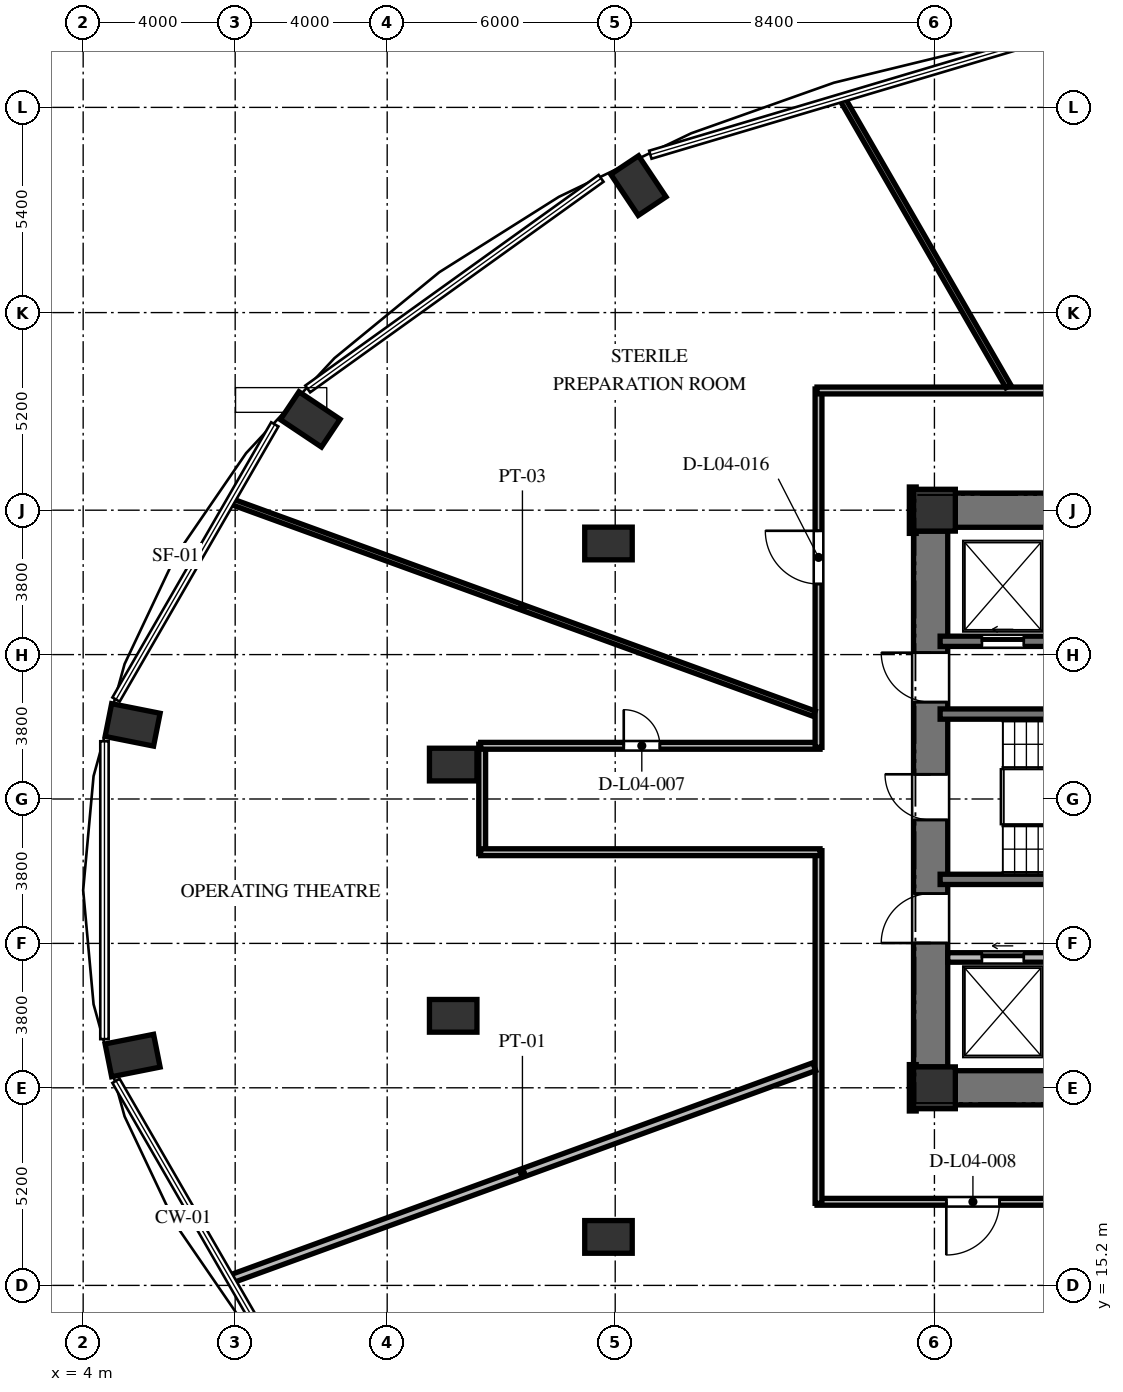
"""IFC4 building model, lengths in metres.
Left out: names, types, materials, properties, quantities, classifications, styles, units other than length and angle.
Written with IfcOpenShell. Run it as: python <this file> out.ifc"""

import sys

from ifc_helpers import new_model, si_unit, direction, frame, frame_2d, origin, origin_2d, place, context, subcontext, project, spatial, rectangle, extrude, element, fill, save


model = new_model("IFC4")
c1 = context("Model", 3, precision=1e-05, world=origin(), true_north=direction((0.0, 1.0)))
c2 = subcontext(c1, "Body", "Model", "MODEL_VIEW")
j1 = project(units=[si_unit("LENGTHUNIT", "METRE"), si_unit("PLANEANGLEUNIT", "RADIAN")], contexts=[c1])
p1 = place(None, origin())
s1 = spatial("IfcSite", under=j1, at=p1, CompositionType="ELEMENT")
p2 = place(p1, origin())
s2 = spatial("IfcBuilding", under=s1, at=p2, CompositionType="ELEMENT")
p3 = place(p2, frame((0.0, 0.0, 20.4)))
s3 = spatial("IfcBuildingStorey", under=s2, at=p3, CompositionType="ELEMENT", Elevation=20.4)
for number, where, z_axis, x_axis in (
    (1, (18.611, 44.142, 0.0), (0.0, 0.0, 1.0), (-0.556, 0.831, 0.0)),
    (2, (9.975, 37.989, 0.0), (0.0, 0.0, 1.0), (-0.831, 0.556, 0.0)),
    (3, (5.302, 29.95, 0.0), (0.0, 0.0, 1.0), (-0.981, 0.195, 0.0)),
    (4, (5.302, 21.25, 0.0), (0.0, 0.0, 1.0), (-0.981, -0.195, 0.0)),
):
    element("IfcColumn", number, at=place(p3, frame(where, z_axis=z_axis, x_axis=x_axis)), inside=s3, PredefinedType="COLUMN", context=c2, shape_type="SweptSolid", body=[
        extrude(rectangle(XDim=1.3, YDim=0.88, at=origin_2d()), origin(), (0.0, 0.0, 1.0), 4.8),
    ])
for number, where, z_axis, x_axis in (
    (5, (26.4, 20.4, 0.0), (0.0, 0.0, 1.0), (1.0, 0.0, 0.0)),
    (6, (26.4, 35.6, 0.0), (0.0, 0.0, 1.0), (1.0, 0.0, 0.0)),
):
    element("IfcColumn", number, at=place(p3, frame(where, z_axis=z_axis, x_axis=x_axis)), inside=s3, PredefinedType="COLUMN", context=c2, shape_type="SweptSolid", body=[
        extrude(rectangle(XDim=1.1, YDim=1.1, at=origin_2d()), origin(), (0.0, 0.0, 1.0), 4.8),
    ])
for number, where, z_axis, x_axis in (
    (7, (17.823, 34.724, 0.0), (0.0, 0.0, 1.0), (1.0, 0.0, 0.0)),
    (8, (13.737, 28.906, 0.0), (0.0, 0.0, 1.0), (1.0, 0.0, 0.0)),
    (9, (13.737, 22.294, 0.0), (0.0, 0.0, 1.0), (1.0, 0.0, 0.0)),
    (10, (17.823, 16.476, 0.0), (0.0, 0.0, 1.0), (1.0, 0.0, 0.0)),
):
    element("IfcColumn", number, at=place(p3, frame(where, z_axis=z_axis, x_axis=x_axis)), inside=s3, PredefinedType="COLUMN", context=c2, shape_type="SweptSolid", body=[
        extrude(rectangle(XDim=1.25, YDim=0.86, at=origin_2d()), origin(), (0.0, 0.0, 1.0), 4.8),
    ])
p4 = place(p3, frame((26.3, 20.95, 0.0), z_axis=(0.0, 0.0, 1.0), x_axis=(0.0, 1.0, 0.0)))
e11 = element("IfcWall", 11, at=p4, inside=s3, PredefinedType="SHEAR", context=c2, shape_type="SweptSolid", body=[
    extrude(rectangle(XDim=14.1, YDim=0.9, at=frame_2d((7.05, 0.0))), origin(), (0.0, 0.0, 1.0), 4.8),
])
p5 = place(p4, frame((6.5, 0.0, 0.0)))
e12 = element("IfcOpeningElement", 12, at=p5, cuts=e11, PredefinedType="OPENING", context=c2, shape_type="SweptSolid", body=[
    extrude(rectangle(XDim=1.2, YDim=2.15, at=frame_2d((0.6, 1.075))), frame((0.0, 0.46, 0.0), z_axis=(0.0, -1.0, 0.0), x_axis=(1.0, 0.0, 0.0)), (0.0, 0.0, 1.0), 0.92),
])
p6 = place(p4, frame((9.6, 0.0, 0.0)))
e13 = element("IfcOpeningElement", 13, at=p6, cuts=e11, PredefinedType="OPENING", context=c2, shape_type="SweptSolid", body=[
    extrude(rectangle(XDim=1.3, YDim=2.2, at=frame_2d((0.65, 1.1))), frame((0.0, 0.46, 0.0), z_axis=(0.0, -1.0, 0.0), x_axis=(1.0, 0.0, 0.0)), (0.0, 0.0, 1.0), 0.92),
])
p7 = place(p4, frame((3.26, 0.0, 0.0)))
e14 = element("IfcOpeningElement", 14, at=p7, cuts=e11, PredefinedType="OPENING", context=c2, shape_type="SweptSolid", body=[
    extrude(rectangle(XDim=1.3, YDim=2.2, at=frame_2d((0.65, 1.1))), frame((0.0, 0.46, 0.0), z_axis=(0.0, -1.0, 0.0), x_axis=(1.0, 0.0, 0.0)), (0.0, 0.0, 1.0), 0.92),
])
for number, where, z_axis, x_axis in (
    (15, (26.95, 20.4, 0.0), (0.0, 0.0, 1.0), (1.0, 0.0, 0.0)),
    (16, (26.95, 35.6, 0.0), (0.0, 0.0, 1.0), (1.0, 0.0, 0.0)),
):
    element("IfcWall", number, at=place(p3, frame(where, z_axis=z_axis, x_axis=x_axis)), inside=s3, PredefinedType="SHEAR", context=c2, shape_type="SweptSolid", body=[
        extrude(rectangle(XDim=5.3, YDim=0.9, at=frame_2d((2.65, 0.0))), origin(), (0.0, 0.0, 1.0), 4.8),
    ])
for number, where, z_axis, x_axis in (
    (17, (26.55, 30.235, 0.0), (0.0, 0.0, 1.0), (1.0, 0.0, 0.0)),
    (18, (26.55, 25.885, 0.0), (0.0, 0.0, 1.0), (1.0, 0.0, 0.0)),
):
    element("IfcWall", number, at=place(p3, frame(where, z_axis=z_axis, x_axis=x_axis)), inside=s3, PredefinedType="SHEAR", context=c2, shape_type="SweptSolid", body=[
        extrude(rectangle(XDim=7.985, YDim=0.27, at=frame_2d((3.992, 0.0))), origin(), (0.0, 0.0, 1.0), 4.8),
    ])
p8 = place(p3, frame((26.55, 32.15, 0.0), z_axis=(0.0, 0.0, 1.0), x_axis=(1.0, 0.0, 0.0)))
e19 = element("IfcWall", 19, at=p8, inside=s3, PredefinedType="SHEAR", context=c2, shape_type="SweptSolid", body=[
    extrude(rectangle(XDim=16.4, YDim=0.27, at=frame_2d((8.2, 0.0))), origin(), (0.0, 0.0, 1.0), 4.8),
])
p9 = place(p8, frame((1.1, 0.0, 0.0)))
e20 = element("IfcOpeningElement", 20, at=p9, cuts=e19, PredefinedType="OPENING", context=c2, shape_type="SweptSolid", body=[
    extrude(rectangle(XDim=1.1, YDim=2.2, at=frame_2d((0.55, 1.1))), frame((0.0, 0.145, 0.0), z_axis=(0.0, -1.0, 0.0), x_axis=(1.0, 0.0, 0.0)), (0.0, 0.0, 1.0), 0.29),
])
p10 = place(p8, frame((3.7, 0.0, 0.0)))
e21 = element("IfcOpeningElement", 21, at=p10, cuts=e19, PredefinedType="OPENING", context=c2, shape_type="SweptSolid", body=[
    extrude(rectangle(XDim=1.1, YDim=2.2, at=frame_2d((0.55, 1.1))), frame((0.0, 0.145, 0.0), z_axis=(0.0, -1.0, 0.0), x_axis=(1.0, 0.0, 0.0)), (0.0, 0.0, 1.0), 0.29),
])
p11 = place(p8, frame((6.5, 0.0, 0.0)))
e22 = element("IfcOpeningElement", 22, at=p11, cuts=e19, PredefinedType="OPENING", context=c2, shape_type="SweptSolid", body=[
    extrude(rectangle(XDim=1.1, YDim=2.2, at=frame_2d((0.55, 1.1))), frame((0.0, 0.145, 0.0), z_axis=(0.0, -1.0, 0.0), x_axis=(1.0, 0.0, 0.0)), (0.0, 0.0, 1.0), 0.29),
])
p12 = place(p8, frame((9.1, 0.0, 0.0)))
e23 = element("IfcOpeningElement", 23, at=p12, cuts=e19, PredefinedType="OPENING", context=c2, shape_type="SweptSolid", body=[
    extrude(rectangle(XDim=1.1, YDim=2.2, at=frame_2d((0.55, 1.1))), frame((0.0, 0.145, 0.0), z_axis=(0.0, -1.0, 0.0), x_axis=(1.0, 0.0, 0.0)), (0.0, 0.0, 1.0), 0.29),
])
p13 = place(p8, frame((11.9, 0.0, 0.0)))
e24 = element("IfcOpeningElement", 24, at=p13, cuts=e19, PredefinedType="OPENING", context=c2, shape_type="SweptSolid", body=[
    extrude(rectangle(XDim=1.1, YDim=2.2, at=frame_2d((0.55, 1.1))), frame((0.0, 0.145, 0.0), z_axis=(0.0, -1.0, 0.0), x_axis=(1.0, 0.0, 0.0)), (0.0, 0.0, 1.0), 0.29),
])
p14 = place(p8, frame((14.5, 0.0, 0.0)))
e25 = element("IfcOpeningElement", 25, at=p14, cuts=e19, PredefinedType="OPENING", context=c2, shape_type="SweptSolid", body=[
    extrude(rectangle(XDim=1.1, YDim=2.2, at=frame_2d((0.55, 1.1))), frame((0.0, 0.145, 0.0), z_axis=(0.0, -1.0, 0.0), x_axis=(1.0, 0.0, 0.0)), (0.0, 0.0, 1.0), 0.29),
])
p15 = place(p3, frame((26.75, 23.83, 0.0), z_axis=(0.0, 0.0, 1.0), x_axis=(1.0, 0.0, 0.0)))
e26 = element("IfcWall", 26, at=p15, inside=s3, PredefinedType="SOLIDWALL", context=c2, shape_type="SweptSolid", body=[
    extrude(rectangle(XDim=16.2, YDim=0.25, at=frame_2d((8.1, 0.0))), origin(), (0.0, 0.0, 1.0), 4.58),
])
p16 = place(p15, frame((0.9, 0.0, 0.0)))
e27 = element("IfcOpeningElement", 27, at=p16, cuts=e26, PredefinedType="OPENING", context=c2, shape_type="SweptSolid", body=[
    extrude(rectangle(XDim=1.1, YDim=2.2, at=frame_2d((0.55, 1.1))), frame((0.0, 0.135, 0.0), z_axis=(0.0, -1.0, 0.0), x_axis=(1.0, 0.0, 0.0)), (0.0, 0.0, 1.0), 0.27),
])
p17 = place(p15, frame((3.5, 0.0, 0.0)))
e28 = element("IfcOpeningElement", 28, at=p17, cuts=e26, PredefinedType="OPENING", context=c2, shape_type="SweptSolid", body=[
    extrude(rectangle(XDim=1.1, YDim=2.2, at=frame_2d((0.55, 1.1))), frame((0.0, 0.135, 0.0), z_axis=(0.0, -1.0, 0.0), x_axis=(1.0, 0.0, 0.0)), (0.0, 0.0, 1.0), 0.27),
])
p18 = place(p15, frame((6.3, 0.0, 0.0)))
e29 = element("IfcOpeningElement", 29, at=p18, cuts=e26, PredefinedType="OPENING", context=c2, shape_type="SweptSolid", body=[
    extrude(rectangle(XDim=1.1, YDim=2.2, at=frame_2d((0.55, 1.1))), frame((0.0, 0.135, 0.0), z_axis=(0.0, -1.0, 0.0), x_axis=(1.0, 0.0, 0.0)), (0.0, 0.0, 1.0), 0.27),
])
p19 = place(p15, frame((8.9, 0.0, 0.0)))
e30 = element("IfcOpeningElement", 30, at=p19, cuts=e26, PredefinedType="OPENING", context=c2, shape_type="SweptSolid", body=[
    extrude(rectangle(XDim=1.1, YDim=2.2, at=frame_2d((0.55, 1.1))), frame((0.0, 0.135, 0.0), z_axis=(0.0, -1.0, 0.0), x_axis=(1.0, 0.0, 0.0)), (0.0, 0.0, 1.0), 0.27),
])
p20 = place(p15, frame((11.7, 0.0, 0.0)))
e31 = element("IfcOpeningElement", 31, at=p20, cuts=e26, PredefinedType="OPENING", context=c2, shape_type="SweptSolid", body=[
    extrude(rectangle(XDim=1.1, YDim=2.2, at=frame_2d((0.55, 1.1))), frame((0.0, 0.135, 0.0), z_axis=(0.0, -1.0, 0.0), x_axis=(1.0, 0.0, 0.0)), (0.0, 0.0, 1.0), 0.27),
])
p21 = place(p15, frame((14.15, 0.0, 0.0)))
e32 = element("IfcOpeningElement", 32, at=p21, cuts=e26, PredefinedType="OPENING", context=c2, shape_type="SweptSolid", body=[
    extrude(rectangle(XDim=1.4, YDim=2.3, at=frame_2d((0.7, 1.15))), frame((0.0, 0.135, 0.0), z_axis=(0.0, -1.0, 0.0), x_axis=(1.0, 0.0, 0.0)), (0.0, 0.0, 1.0), 0.27),
])
p22 = place(p3, frame((14.5, 26.56, 0.0), z_axis=(0.0, 0.0, 1.0), x_axis=(0.0, 1.0, 0.0)))
e33 = element("IfcWall", 33, at=p22, inside=s3, PredefinedType="PARTITIONING", context=c2, shape_type="SweptSolid", body=[
    extrude(rectangle(XDim=2.88, YDim=0.18, at=frame_2d((1.44, 0.0))), origin(), (0.0, 0.0, 1.0), 4.58),
])
p23 = place(p3, frame((14.46, 29.4, 0.0), z_axis=(0.0, 0.0, 1.0), x_axis=(1.0, 0.0, 0.0)))
e34 = element("IfcWall", 34, at=p23, inside=s3, PredefinedType="PARTITIONING", context=c2, shape_type="SweptSolid", body=[
    extrude(rectangle(XDim=8.93, YDim=0.18, at=frame_2d((4.465, 0.0))), origin(), (0.0, 0.0, 1.0), 4.58),
])
p24 = place(p23, frame((3.765, 0.0, 0.0)))
e35 = element("IfcOpeningElement", 35, at=p24, cuts=e34, PredefinedType="OPENING", context=c2, shape_type="SweptSolid", body=[
    extrude(rectangle(XDim=0.95, YDim=2.1, at=frame_2d((0.475, 1.05))), frame((0.0, 0.1, 0.0), z_axis=(0.0, -1.0, 0.0), x_axis=(1.0, 0.0, 0.0)), (0.0, 0.0, 1.0), 0.2),
])
p25 = place(p3, frame((23.35, 29.36, 0.0), z_axis=(0.0, 0.0, 1.0), x_axis=(0.0, 1.0, 0.0)))
e36 = element("IfcWall", 36, at=p25, inside=s3, PredefinedType="PARTITIONING", context=c2, shape_type="SweptSolid", body=[
    extrude(rectangle(XDim=9.43, YDim=0.18, at=frame_2d((4.715, 0.0))), origin(), (0.0, 0.0, 1.0), 4.58),
])
p26 = place(p25, frame((4.298, 0.0, 0.0)))
e37 = element("IfcOpeningElement", 37, at=p26, cuts=e36, PredefinedType="OPENING", context=c2, shape_type="SweptSolid", body=[
    extrude(rectangle(XDim=1.4, YDim=2.2, at=frame_2d((0.7, 1.1))), frame((0.0, 0.1, 0.0), z_axis=(0.0, -1.0, 0.0), x_axis=(1.0, 0.0, 0.0)), (0.0, 0.0, 1.0), 0.2),
])
p27 = place(p3, frame((23.31, 38.75, 0.0), z_axis=(0.0, 0.0, 1.0), x_axis=(1.0, 0.0, 0.0)))
e38 = element("IfcWall", 38, at=p27, inside=s3, PredefinedType="PARTITIONING", context=c2, shape_type="SweptSolid", body=[
    extrude(rectangle(XDim=29.88, YDim=0.18, at=frame_2d((14.94, 0.0))), origin(), (0.0, 0.0, 1.0), 4.58),
])
p28 = place(p27, frame((22.324, 0.0, 0.0)))
e39 = element("IfcOpeningElement", 39, at=p28, cuts=e38, PredefinedType="OPENING", context=c2, shape_type="SweptSolid", body=[
    extrude(rectangle(XDim=1.05, YDim=2.15, at=frame_2d((0.525, 1.075))), frame((0.0, 0.1, 0.0), z_axis=(0.0, -1.0, 0.0), x_axis=(1.0, 0.0, 0.0)), (0.0, 0.0, 1.0), 0.2),
])
p29 = place(p27, frame((11.015, 0.0, 0.0)))
e40 = element("IfcOpeningElement", 40, at=p29, cuts=e38, PredefinedType="OPENING", context=c2, shape_type="SweptSolid", body=[
    extrude(rectangle(XDim=0.95, YDim=2.1, at=frame_2d((0.475, 1.05))), frame((0.0, 0.1, 0.0), z_axis=(0.0, -1.0, 0.0), x_axis=(1.0, 0.0, 0.0)), (0.0, 0.0, 1.0), 0.2),
])
for number, where, z_axis, x_axis in (
    (41, (25.83, 36.21, 0.0), (0.0, 0.0, 1.0), (0.0, -1.0, 0.0)),
    (42, (25.83, 21.01, 0.0), (0.0, 0.0, 1.0), (0.0, -1.0, 0.0)),
):
    element("IfcWall", number, at=place(p3, frame(where, z_axis=z_axis, x_axis=x_axis)), inside=s3, PredefinedType="PARTITIONING", context=c2, shape_type="SweptSolid", body=[
        extrude(rectangle(XDim=1.22, YDim=0.18, at=frame_2d((0.61, 0.0))), origin(), (0.0, 0.0, 1.0), 4.58),
    ])
p30 = place(p3, frame((45.24, 17.4, 0.0), z_axis=(0.0, 0.0, 1.0), x_axis=(-1.0, 0.0, 0.0)))
e43 = element("IfcWall", 43, at=p30, inside=s3, PredefinedType="PARTITIONING", context=c2, shape_type="SweptSolid", body=[
    extrude(rectangle(XDim=21.93, YDim=0.18, at=frame_2d((10.965, 0.0))), origin(), (0.0, 0.0, 1.0), 4.58),
])
p31 = place(p30, frame((17.127, 0.0, 0.0)))
e44 = element("IfcOpeningElement", 44, at=p31, cuts=e43, PredefinedType="OPENING", context=c2, shape_type="SweptSolid", body=[
    extrude(rectangle(XDim=1.4, YDim=2.2, at=frame_2d((0.7, 1.1))), frame((0.0, 0.1, 0.0), z_axis=(0.0, -1.0, 0.0), x_axis=(1.0, 0.0, 0.0)), (0.0, 0.0, 1.0), 0.2),
])
p32 = place(p30, frame((9.071, 0.0, 0.0)))
e45 = element("IfcOpeningElement", 45, at=p32, cuts=e43, PredefinedType="OPENING", context=c2, shape_type="SweptSolid", body=[
    extrude(rectangle(XDim=0.95, YDim=2.1, at=frame_2d((0.475, 1.05))), frame((0.0, 0.1, 0.0), z_axis=(0.0, -1.0, 0.0), x_axis=(1.0, 0.0, 0.0)), (0.0, 0.0, 1.0), 0.2),
])
p33 = place(p30, frame((2.177, 0.0, 0.0)))
e46 = element("IfcOpeningElement", 46, at=p33, cuts=e43, PredefinedType="OPENING", context=c2, shape_type="SweptSolid", body=[
    extrude(rectangle(XDim=1.4, YDim=2.2, at=frame_2d((0.7, 1.1))), frame((0.0, 0.1, 0.0), z_axis=(0.0, -1.0, 0.0), x_axis=(1.0, 0.0, 0.0)), (0.0, 0.0, 1.0), 0.2),
])
p34 = place(p3, frame((23.35, 17.36, 0.0), z_axis=(0.0, 0.0, 1.0), x_axis=(0.0, 1.0, 0.0)))
e47 = element("IfcWall", 47, at=p34, inside=s3, PredefinedType="PARTITIONING", context=c2, shape_type="SweptSolid", body=[
    extrude(rectangle(XDim=9.28, YDim=0.18, at=frame_2d((4.64, 0.0))), origin(), (0.0, 0.0, 1.0), 4.58),
])
p35 = place(p3, frame((23.39, 26.6, 0.0), z_axis=(0.0, 0.0, 1.0), x_axis=(-1.0, 0.0, 0.0)))
e48 = element("IfcWall", 48, at=p35, inside=s3, PredefinedType="PARTITIONING", context=c2, shape_type="SweptSolid", body=[
    extrude(rectangle(XDim=8.93, YDim=0.18, at=frame_2d((4.465, 0.0))), origin(), (0.0, 0.0, 1.0), 4.58),
])
p36 = place(p3, frame((28.346, 38.857, 0.0), z_axis=(0.0, 0.0, 1.0), x_axis=(-0.500008731563, 0.866020362555, 0.0)))
e49 = element("IfcWall", 49, at=p36, inside=s3, PredefinedType="PARTITIONING", context=c2, shape_type="SweptSolid", body=[
    extrude(rectangle(XDim=8.76, YDim=0.15, at=frame_2d((4.38, 0.0))), origin(), (0.0, 0.0, 1.0), 4.58),
])
p37 = place(p3, frame((23.239, 30.245, 0.0), z_axis=(0.0, 0.0, 1.0), x_axis=(-0.939691331374, 0.342023685934, 0.0)))
e50 = element("IfcWall", 50, at=p37, inside=s3, PredefinedType="PARTITIONING", context=c2, shape_type="SweptSolid", body=[
    extrude(rectangle(XDim=16.345, YDim=0.15, at=frame_2d((8.172, 0.0))), origin(), (0.0, 0.0, 1.0), 4.58),
])
p38 = place(p3, frame((23.239, 20.955, 0.0), z_axis=(0.0, 0.0, 1.0), x_axis=(-0.939696131956, -0.342010496311, 0.0)))
e51 = element("IfcWall", 51, at=p38, inside=s3, PredefinedType="PARTITIONING", context=c2, shape_type="SweptSolid", body=[
    extrude(rectangle(XDim=16.345, YDim=0.22, at=frame_2d((8.172, 0.0))), origin(), (0.0, 0.0, 1.0), 4.58),
])
p39 = place(p3, frame((31.204, 17.293, 0.0), z_axis=(0.0, 0.0, 1.0), x_axis=(-0.500008108359, -0.866020722371, 0.0)))
e52 = element("IfcWall", 52, at=p39, inside=s3, PredefinedType="PARTITIONING", context=c2, shape_type="SweptSolid", body=[
    extrude(rectangle(XDim=14.476, YDim=0.15, at=frame_2d((7.238, 0.0))), origin(), (0.0, 0.0, 1.0), 4.58),
])
p40 = place(p5, origin())
e53 = element("IfcDoor", 53, at=p40, inside=s3, OperationType="SINGLE_SWING_RIGHT", PredefinedType="DOOR", context=c2, shape_type="SweptSolid", body=[
    extrude(rectangle(XDim=1.2, YDim=2.15, at=frame_2d((0.6, 1.075))), frame((0.0, 0.025, 0.0), z_axis=(0.0, -1.0, 0.0), x_axis=(1.0, 0.0, 0.0)), (0.0, 0.0, 1.0), 0.05),
])
fill(e12, e53)
p41 = place(p6, origin())
e54 = element("IfcDoor", 54, at=p41, inside=s3, OperationType="SINGLE_SWING_RIGHT", PredefinedType="DOOR", context=c2, shape_type="SweptSolid", body=[
    extrude(rectangle(XDim=1.3, YDim=2.2, at=frame_2d((0.65, 1.1))), frame((0.0, 0.025, 0.0), z_axis=(0.0, -1.0, 0.0), x_axis=(1.0, 0.0, 0.0)), (0.0, 0.0, 1.0), 0.05),
])
fill(e13, e54)
p42 = place(p7, origin())
e55 = element("IfcDoor", 55, at=p42, inside=s3, OperationType="SINGLE_SWING_LEFT", PredefinedType="DOOR", context=c2, shape_type="SweptSolid", body=[
    extrude(rectangle(XDim=1.3, YDim=2.2, at=frame_2d((0.65, 1.1))), frame((0.0, 0.025, 0.0), z_axis=(0.0, -1.0, 0.0), x_axis=(1.0, 0.0, 0.0)), (0.0, 0.0, 1.0), 0.05),
])
fill(e14, e55)
p43 = place(p9, origin())
e56 = element("IfcDoor", 56, at=p43, inside=s3, OperationType="SLIDING_TO_LEFT", PredefinedType="DOOR", context=c2, shape_type="SweptSolid", body=[
    extrude(rectangle(XDim=1.1, YDim=2.2, at=frame_2d((0.55, 1.1))), frame((0.0, 0.025, 0.0), z_axis=(0.0, -1.0, 0.0), x_axis=(1.0, 0.0, 0.0)), (0.0, 0.0, 1.0), 0.05),
])
fill(e20, e56)
p44 = place(p16, origin())
e57 = element("IfcDoor", 57, at=p44, inside=s3, OperationType="SLIDING_TO_LEFT", PredefinedType="DOOR", context=c2, shape_type="SweptSolid", body=[
    extrude(rectangle(XDim=1.1, YDim=2.2, at=frame_2d((0.55, 1.1))), frame((0.0, 0.025, 0.0), z_axis=(0.0, -1.0, 0.0), x_axis=(1.0, 0.0, 0.0)), (0.0, 0.0, 1.0), 0.05),
])
fill(e27, e57)
p45 = place(p24, origin())
e58 = element("IfcDoor", 58, at=p45, inside=s3, OperationType="SINGLE_SWING_LEFT", PredefinedType="DOOR", context=c2, shape_type="SweptSolid", body=[
    extrude(rectangle(XDim=0.95, YDim=2.1, at=frame_2d((0.475, 1.05))), frame((0.0, 0.025, 0.0), z_axis=(0.0, -1.0, 0.0), x_axis=(1.0, 0.0, 0.0)), (0.0, 0.0, 1.0), 0.05),
])
fill(e35, e58)
p46 = place(p31, origin())
e59 = element("IfcDoor", 59, at=p46, inside=s3, OperationType="SINGLE_SWING_RIGHT", PredefinedType="DOOR", context=c2, shape_type="SweptSolid", body=[
    extrude(rectangle(XDim=1.4, YDim=2.2, at=frame_2d((0.7, 1.1))), frame((0.0, 0.025, 0.0), z_axis=(0.0, -1.0, 0.0), x_axis=(1.0, 0.0, 0.0)), (0.0, 0.0, 1.0), 0.05),
])
fill(e44, e59)
p47 = place(p26, origin())
e60 = element("IfcDoor", 60, at=p47, inside=s3, OperationType="SINGLE_SWING_RIGHT", PredefinedType="DOOR", context=c2, shape_type="SweptSolid", body=[
    extrude(rectangle(XDim=1.4, YDim=2.2, at=frame_2d((0.7, 1.1))), frame((0.0, 0.025, 0.0), z_axis=(0.0, -1.0, 0.0), x_axis=(1.0, 0.0, 0.0)), (0.0, 0.0, 1.0), 0.05),
])
fill(e37, e60)
save(model, sys.argv[1])
